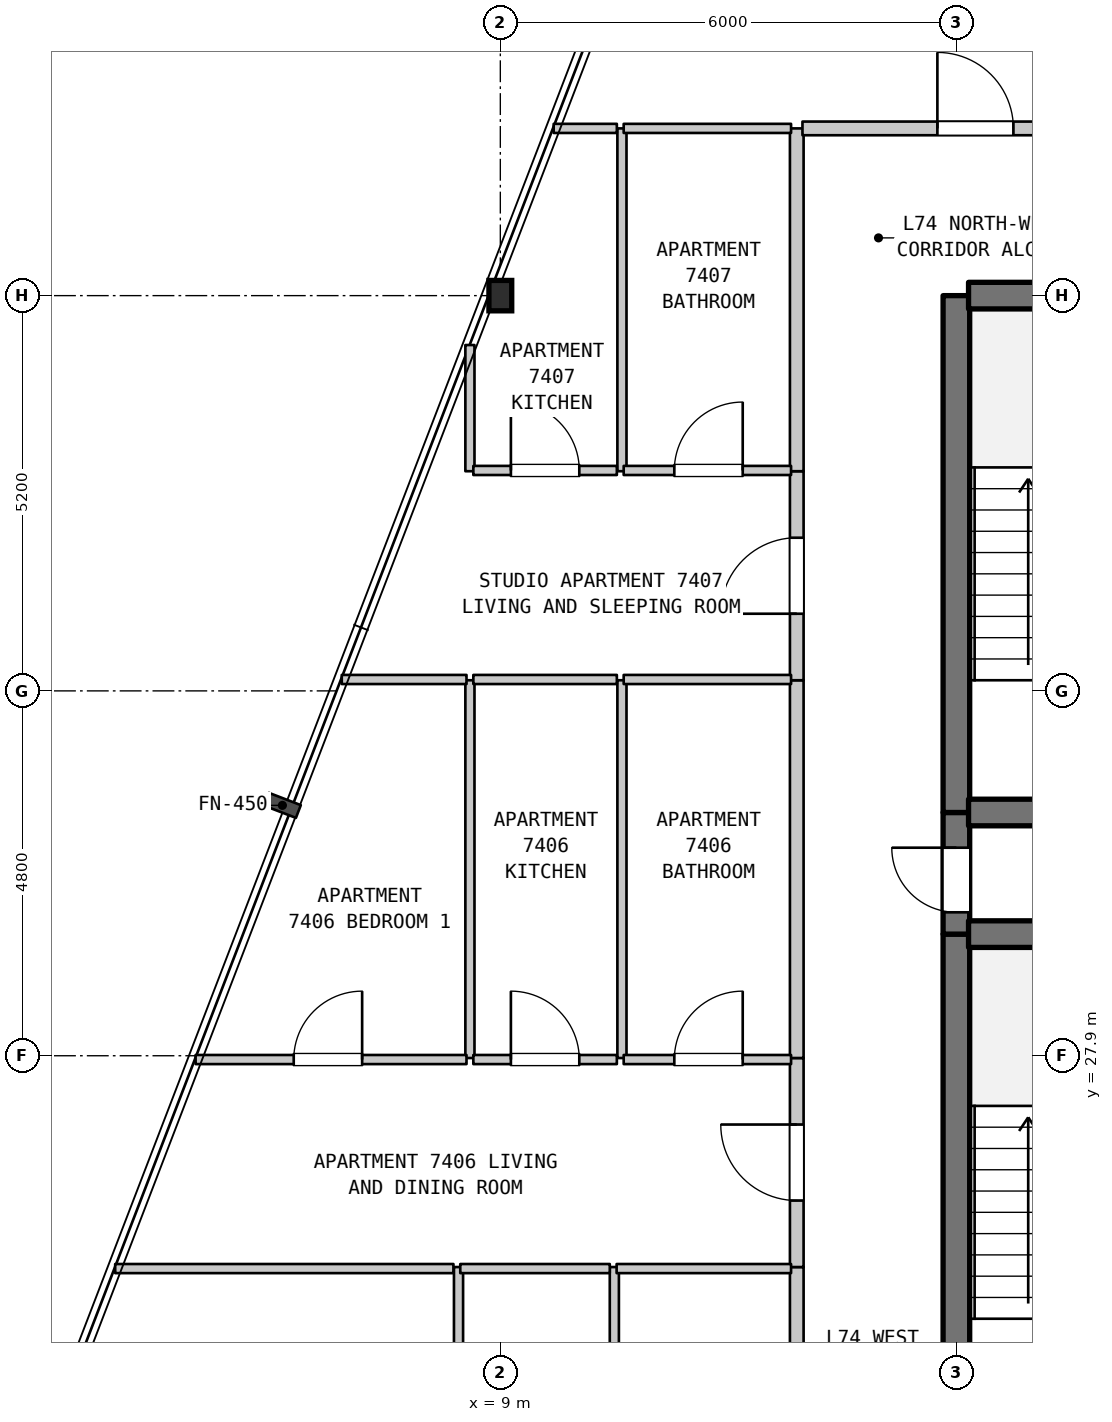
"""IFC4 building model, lengths in metres.
Left out: names, types, materials, properties, quantities, classifications, styles, units other than length and angle.
Written with IfcOpenShell. Run it as: python <this file> out.ifc"""

import sys

from ifc_helpers import new_model, si_unit, direction, frame, frame_2d, origin, origin_2d, place, context, subcontext, project, spatial, rectangle, i_section, extrude, element, fill, save


model = new_model("IFC4")
c1 = context("Model", 3, precision=1e-05, world=origin(), true_north=direction((0.0, 1.0)))
c2 = subcontext(c1, "Body", "Model", "MODEL_VIEW")
j1 = project(units=[si_unit("LENGTHUNIT", "METRE"), si_unit("PLANEANGLEUNIT", "RADIAN")], contexts=[c1])
p1 = place(None, origin())
s1 = spatial("IfcSite", under=j1, at=p1, CompositionType="ELEMENT")
p2 = place(p1, origin())
s2 = spatial("IfcBuilding", under=s1, at=p2, CompositionType="ELEMENT")
p3 = place(p2, frame((0.0, 0.0, 295.4)))
s3 = spatial("IfcBuildingStorey", under=s2, at=p3, CompositionType="ELEMENT", Elevation=295.4)
p4 = place(p3, frame((9.0, 37.9, 0.0), z_axis=(0.0, 0.0, 1.0), x_axis=(1.0, 0.0, 0.0)))
e1 = element("IfcColumn", 1, at=p4, inside=s3, PredefinedType="COLUMN", context=c2, shape_type="SweptSolid", body=[
    extrude(i_section(OverallWidth=0.3, OverallDepth=0.4, WebThickness=0.013, FlangeThickness=0.024, FilletRadius=0.027, at=origin_2d()), origin(), (0.0, 0.0, 1.0), 3.7),
])
p5 = place(p3, frame((8.45, 20.15, 0.0), z_axis=(0.0, 0.0, 1.0), x_axis=(0.0, 1.0, 0.0)))
e2 = element("IfcWall", 2, at=p5, inside=s3, PredefinedType="PARTITIONING", context=c2, shape_type="SweptSolid", body=[
    extrude(rectangle(XDim=4.97, YDim=0.12, at=frame_2d((2.485, 0.0))), origin(), (0.0, 0.0, 1.0), 3.38),
])
p6 = place(p3, frame((8.6, 27.87, 0.0), z_axis=(0.0, 0.0, 1.0), x_axis=(0.0, 1.0, 0.0)))
e3 = element("IfcWall", 3, at=p6, inside=s3, PredefinedType="PARTITIONING", context=c2, shape_type="SweptSolid", body=[
    extrude(rectangle(XDim=4.97, YDim=0.12, at=frame_2d((2.485, 0.0))), origin(), (0.0, 0.0, 1.0), 3.38),
])
p7 = place(p3, frame((8.6, 35.59, 0.0), z_axis=(0.0, 0.0, 1.0), x_axis=(0.0, 1.0, 0.0)))
e4 = element("IfcWall", 4, at=p7, inside=s3, PredefinedType="PARTITIONING", context=c2, shape_type="SweptSolid", body=[
    extrude(rectangle(XDim=1.66, YDim=0.12, at=frame_2d((0.83, 0.0))), origin(), (0.0, 0.0, 1.0), 3.38),
])
p8 = place(p3, frame((10.5, 20.15, 0.0), z_axis=(0.0, 0.0, 1.0), x_axis=(0.0, 1.0, 0.0)))
e5 = element("IfcWall", 5, at=p8, inside=s3, PredefinedType="PARTITIONING", context=c2, shape_type="SweptSolid", body=[
    extrude(rectangle(XDim=4.97, YDim=0.12, at=frame_2d((2.485, 0.0))), origin(), (0.0, 0.0, 1.0), 3.38),
])
p9 = place(p3, frame((10.6, 27.87, 0.0), z_axis=(0.0, 0.0, 1.0), x_axis=(0.0, 1.0, 0.0)))
e6 = element("IfcWall", 6, at=p9, inside=s3, PredefinedType="PARTITIONING", context=c2, shape_type="SweptSolid", body=[
    extrude(rectangle(XDim=4.97, YDim=0.12, at=frame_2d((2.485, 0.0))), origin(), (0.0, 0.0, 1.0), 3.38),
])
p10 = place(p3, frame((10.6, 35.59, 0.0), z_axis=(0.0, 0.0, 1.0), x_axis=(0.0, 1.0, 0.0)))
e7 = element("IfcWall", 7, at=p10, inside=s3, PredefinedType="PARTITIONING", context=c2, shape_type="SweptSolid", body=[
    extrude(rectangle(XDim=4.51, YDim=0.12, at=frame_2d((2.255, 0.0))), origin(), (0.0, 0.0, 1.0), 3.38),
])
p11 = place(p3, frame((12.9, 20.15, 0.0), z_axis=(0.0, 0.0, 1.0), x_axis=(0.0, 1.0, 0.0)))
e8 = element("IfcWall", 8, at=p11, inside=s3, PredefinedType="STANDARD", context=c2, shape_type="SweptSolid", body=[
    extrude(rectangle(XDim=4.97, YDim=0.18, at=frame_2d((2.485, 0.0))), origin(), (0.0, 0.0, 1.0), 3.38),
])
p12 = place(p3, frame((12.9, 25.12, 0.0), z_axis=(0.0, 0.0, 1.0), x_axis=(0.0, 1.0, 0.0)))
e9 = element("IfcWall", 9, at=p12, inside=s3, PredefinedType="STANDARD", context=c2, shape_type="SweptSolid", body=[
    extrude(rectangle(XDim=2.75, YDim=0.18, at=frame_2d((1.375, 0.0))), origin(), (0.0, 0.0, 1.0), 3.38),
])
p13 = place(p12, frame((0.875, 0.0, 0.0)))
e10 = element("IfcOpeningElement", 10, at=p13, cuts=e9, PredefinedType="OPENING", context=c2, shape_type="SweptSolid", body=[
    extrude(rectangle(XDim=1.0, YDim=2.15, at=frame_2d((0.5, 1.075))), frame((0.0, 0.1, 0.0), z_axis=(0.0, -1.0, 0.0), x_axis=(1.0, 0.0, 0.0)), (0.0, 0.0, 1.0), 0.2),
])
p14 = place(p3, frame((12.9, 27.87, 0.0), z_axis=(0.0, 0.0, 1.0), x_axis=(0.0, 1.0, 0.0)))
e11 = element("IfcWall", 11, at=p14, inside=s3, PredefinedType="STANDARD", context=c2, shape_type="SweptSolid", body=[
    extrude(rectangle(XDim=4.97, YDim=0.18, at=frame_2d((2.485, 0.0))), origin(), (0.0, 0.0, 1.0), 3.38),
])
p15 = place(p3, frame((12.9, 32.84, 0.0), z_axis=(0.0, 0.0, 1.0), x_axis=(0.0, 1.0, 0.0)))
e12 = element("IfcWall", 12, at=p15, inside=s3, PredefinedType="STANDARD", context=c2, shape_type="SweptSolid", body=[
    extrude(rectangle(XDim=2.75, YDim=0.18, at=frame_2d((1.375, 0.0))), origin(), (0.0, 0.0, 1.0), 3.38),
])
p16 = place(p15, frame((0.875, 0.0, 0.0)))
e13 = element("IfcOpeningElement", 13, at=p16, cuts=e12, PredefinedType="OPENING", context=c2, shape_type="SweptSolid", body=[
    extrude(rectangle(XDim=1.0, YDim=2.15, at=frame_2d((0.5, 1.075))), frame((0.0, 0.1, 0.0), z_axis=(0.0, -1.0, 0.0), x_axis=(1.0, 0.0, 0.0)), (0.0, 0.0, 1.0), 0.2),
])
p17 = place(p3, frame((12.9, 35.59, 0.0), z_axis=(0.0, 0.0, 1.0), x_axis=(0.0, 1.0, 0.0)))
e14 = element("IfcWall", 14, at=p17, inside=s3, PredefinedType="STANDARD", context=c2, shape_type="SweptSolid", body=[
    extrude(rectangle(XDim=4.51, YDim=0.18, at=frame_2d((2.255, 0.0))), origin(), (0.0, 0.0, 1.0), 3.38),
])
p18 = place(p3, frame((15.0, 22.7, 0.0), z_axis=(0.0, 0.0, 1.0), x_axis=(0.0, 1.0, 0.0)))
e15 = element("IfcWall", 15, at=p18, inside=s3, PredefinedType="SHEAR", context=c2, shape_type="SweptSolid", body=[
    extrude(rectangle(XDim=6.8, YDim=0.35, at=frame_2d((3.4, 0.0))), origin(), (0.0, 0.0, 1.0), 3.38),
])
p19 = place(p3, frame((15.0, 29.5, 0.0), z_axis=(0.0, 0.0, 1.0), x_axis=(0.0, 1.0, 0.0)))
e16 = element("IfcWall", 16, at=p19, inside=s3, PredefinedType="SHEAR", context=c2, shape_type="SweptSolid", body=[
    extrude(rectangle(XDim=1.6, YDim=0.35, at=frame_2d((0.8, 0.0))), origin(), (0.0, 0.0, 1.0), 3.38),
])
p20 = place(p19, frame((0.287, 0.0, 0.0)))
e17 = element("IfcOpeningElement", 17, at=p20, cuts=e16, PredefinedType="OPENING", context=c2, shape_type="SweptSolid", body=[
    extrude(rectangle(XDim=0.85, YDim=2.1, at=frame_2d((0.425, 1.05))), frame((0.0, 0.185, 0.0), z_axis=(0.0, -1.0, 0.0), x_axis=(1.0, 0.0, 0.0)), (0.0, 0.0, 1.0), 0.37),
])
p21 = place(p3, frame((15.0, 31.1, 0.0), z_axis=(0.0, 0.0, 1.0), x_axis=(0.0, 1.0, 0.0)))
e18 = element("IfcWall", 18, at=p21, inside=s3, PredefinedType="SHEAR", context=c2, shape_type="SweptSolid", body=[
    extrude(rectangle(XDim=6.8, YDim=0.35, at=frame_2d((3.4, 0.0))), origin(), (0.0, 0.0, 1.0), 3.38),
])
p22 = place(p3, frame((3.933, 25.1, 0.0), z_axis=(0.0, 0.0, 1.0), x_axis=(1.0, 0.0, 0.0)))
e19 = element("IfcWall", 19, at=p22, inside=s3, PredefinedType="PARTITIONING", context=c2, shape_type="SweptSolid", body=[
    extrude(rectangle(XDim=4.45, YDim=0.12, at=frame_2d((2.225, 0.0))), origin(), (0.0, 0.0, 1.0), 3.38),
])
p23 = place(p3, frame((8.473, 25.1, 0.0), z_axis=(0.0, 0.0, 1.0), x_axis=(1.0, 0.0, 0.0)))
e20 = element("IfcWall", 20, at=p23, inside=s3, PredefinedType="PARTITIONING", context=c2, shape_type="SweptSolid", body=[
    extrude(rectangle(XDim=1.967, YDim=0.12, at=frame_2d((0.983, 0.0))), origin(), (0.0, 0.0, 1.0), 3.38),
])
p24 = place(p3, frame((10.53, 25.1, 0.0), z_axis=(0.0, 0.0, 1.0), x_axis=(1.0, 0.0, 0.0)))
e21 = element("IfcWall", 21, at=p24, inside=s3, PredefinedType="PARTITIONING", context=c2, shape_type="SweptSolid", body=[
    extrude(rectangle(XDim=2.295, YDim=0.12, at=frame_2d((1.147, 0.0))), origin(), (0.0, 0.0, 1.0), 3.38),
])
p25 = place(p3, frame((4.991, 27.85, 0.0), z_axis=(0.0, 0.0, 1.0), x_axis=(1.0, 0.0, 0.0)))
e22 = element("IfcWall", 22, at=p25, inside=s3, PredefinedType="PARTITIONING", context=c2, shape_type="SweptSolid", body=[
    extrude(rectangle(XDim=3.564, YDim=0.12, at=frame_2d((1.782, 0.0))), origin(), (0.0, 0.0, 1.0), 3.38),
])
p26 = place(p25, frame((1.291, 0.0, 0.0)))
e23 = element("IfcOpeningElement", 23, at=p26, cuts=e22, PredefinedType="OPENING", context=c2, shape_type="SweptSolid", body=[
    extrude(rectangle(XDim=0.9, YDim=2.15, at=frame_2d((0.45, 1.075))), frame((0.0, 0.07, 0.0), z_axis=(0.0, -1.0, 0.0), x_axis=(1.0, 0.0, 0.0)), (0.0, 0.0, 1.0), 0.14),
])
p27 = place(p3, frame((8.645, 27.85, 0.0), z_axis=(0.0, 0.0, 1.0), x_axis=(1.0, 0.0, 0.0)))
e24 = element("IfcWall", 24, at=p27, inside=s3, PredefinedType="PARTITIONING", context=c2, shape_type="SweptSolid", body=[
    extrude(rectangle(XDim=1.888, YDim=0.12, at=frame_2d((0.944, 0.0))), origin(), (0.0, 0.0, 1.0), 3.38),
])
p28 = place(p27, frame((0.494, 0.0, 0.0)))
e25 = element("IfcOpeningElement", 25, at=p28, cuts=e24, PredefinedType="OPENING", context=c2, shape_type="SweptSolid", body=[
    extrude(rectangle(XDim=0.9, YDim=2.15, at=frame_2d((0.45, 1.075))), frame((0.0, 0.07, 0.0), z_axis=(0.0, -1.0, 0.0), x_axis=(1.0, 0.0, 0.0)), (0.0, 0.0, 1.0), 0.14),
])
p29 = place(p3, frame((10.623, 27.85, 0.0), z_axis=(0.0, 0.0, 1.0), x_axis=(1.0, 0.0, 0.0)))
e26 = element("IfcWall", 26, at=p29, inside=s3, PredefinedType="PARTITIONING", context=c2, shape_type="SweptSolid", body=[
    extrude(rectangle(XDim=2.202, YDim=0.12, at=frame_2d((1.101, 0.0))), origin(), (0.0, 0.0, 1.0), 3.38),
])
p30 = place(p29, frame((0.666, 0.0, 0.0)))
e27 = element("IfcOpeningElement", 27, at=p30, cuts=e26, PredefinedType="OPENING", context=c2, shape_type="SweptSolid", body=[
    extrude(rectangle(XDim=0.9, YDim=2.1, at=frame_2d((0.45, 1.05))), frame((0.0, 0.07, 0.0), z_axis=(0.0, -1.0, 0.0), x_axis=(1.0, 0.0, 0.0)), (0.0, 0.0, 1.0), 0.14),
])
for number, where, z_axis, x_axis in (
    (28, (15.16, 29.5, 0.0), (0.0, 0.0, 1.0), (1.0, 0.0, 0.0)),
    (29, (15.16, 31.1, 0.0), (0.0, 0.0, 1.0), (1.0, 0.0, 0.0)),
):
    element("IfcWall", number, at=place(p3, frame(where, z_axis=z_axis, x_axis=x_axis)), inside=s3, PredefinedType="SHEAR", context=c2, shape_type="SweptSolid", body=[
        extrude(rectangle(XDim=3.68, YDim=0.35, at=frame_2d((1.84, 0.0))), origin(), (0.0, 0.0, 1.0), 3.38),
    ])
p31 = place(p3, frame((6.914, 32.85, 0.0), z_axis=(0.0, 0.0, 1.0), x_axis=(1.0, 0.0, 0.0)))
e30 = element("IfcWall", 30, at=p31, inside=s3, PredefinedType="PARTITIONING", context=c2, shape_type="SweptSolid", body=[
    extrude(rectangle(XDim=1.641, YDim=0.12, at=frame_2d((0.82, 0.0))), origin(), (0.0, 0.0, 1.0), 3.38),
])
p32 = place(p3, frame((8.645, 32.85, 0.0), z_axis=(0.0, 0.0, 1.0), x_axis=(1.0, 0.0, 0.0)))
e31 = element("IfcWall", 31, at=p32, inside=s3, PredefinedType="PARTITIONING", context=c2, shape_type="SweptSolid", body=[
    extrude(rectangle(XDim=1.888, YDim=0.12, at=frame_2d((0.944, 0.0))), origin(), (0.0, 0.0, 1.0), 3.38),
])
p33 = place(p3, frame((10.623, 32.85, 0.0), z_axis=(0.0, 0.0, 1.0), x_axis=(1.0, 0.0, 0.0)))
e32 = element("IfcWall", 32, at=p33, inside=s3, PredefinedType="PARTITIONING", context=c2, shape_type="SweptSolid", body=[
    extrude(rectangle(XDim=2.202, YDim=0.12, at=frame_2d((1.101, 0.0))), origin(), (0.0, 0.0, 1.0), 3.38),
])
p34 = place(p3, frame((8.645, 35.6, 0.0), z_axis=(0.0, 0.0, 1.0), x_axis=(1.0, 0.0, 0.0)))
e33 = element("IfcWall", 33, at=p34, inside=s3, PredefinedType="PARTITIONING", context=c2, shape_type="SweptSolid", body=[
    extrude(rectangle(XDim=1.888, YDim=0.12, at=frame_2d((0.944, 0.0))), origin(), (0.0, 0.0, 1.0), 3.38),
])
p35 = place(p34, frame((0.494, 0.0, 0.0)))
e34 = element("IfcOpeningElement", 34, at=p35, cuts=e33, PredefinedType="OPENING", context=c2, shape_type="SweptSolid", body=[
    extrude(rectangle(XDim=0.9, YDim=2.15, at=frame_2d((0.45, 1.075))), frame((0.0, 0.07, 0.0), z_axis=(0.0, -1.0, 0.0), x_axis=(1.0, 0.0, 0.0)), (0.0, 0.0, 1.0), 0.14),
])
p36 = place(p3, frame((10.623, 35.6, 0.0), z_axis=(0.0, 0.0, 1.0), x_axis=(1.0, 0.0, 0.0)))
e35 = element("IfcWall", 35, at=p36, inside=s3, PredefinedType="PARTITIONING", context=c2, shape_type="SweptSolid", body=[
    extrude(rectangle(XDim=2.202, YDim=0.12, at=frame_2d((1.101, 0.0))), origin(), (0.0, 0.0, 1.0), 3.38),
])
p37 = place(p36, frame((0.666, 0.0, 0.0)))
e36 = element("IfcOpeningElement", 36, at=p37, cuts=e35, PredefinedType="OPENING", context=c2, shape_type="SweptSolid", body=[
    extrude(rectangle(XDim=0.9, YDim=2.1, at=frame_2d((0.45, 1.05))), frame((0.0, 0.07, 0.0), z_axis=(0.0, -1.0, 0.0), x_axis=(1.0, 0.0, 0.0)), (0.0, 0.0, 1.0), 0.14),
])
p38 = place(p3, frame((15.16, 37.9, 0.0), z_axis=(0.0, 0.0, 1.0), x_axis=(1.0, 0.0, 0.0)))
e37 = element("IfcWall", 37, at=p38, inside=s3, PredefinedType="SHEAR", context=c2, shape_type="SweptSolid", body=[
    extrude(rectangle(XDim=3.68, YDim=0.35, at=frame_2d((1.84, 0.0))), origin(), (0.0, 0.0, 1.0), 3.38),
])
p39 = place(p3, frame((9.702, 40.1, 0.0), z_axis=(0.0, 0.0, 1.0), x_axis=(1.0, 0.0, 0.0)))
e38 = element("IfcWall", 38, at=p39, inside=s3, PredefinedType="PARTITIONING", context=c2, shape_type="SweptSolid", body=[
    extrude(rectangle(XDim=0.831, YDim=0.12, at=frame_2d((0.416, 0.0))), origin(), (0.0, 0.0, 1.0), 3.38),
])
p40 = place(p3, frame((10.623, 40.1, 0.0), z_axis=(0.0, 0.0, 1.0), x_axis=(1.0, 0.0, 0.0)))
e39 = element("IfcWall", 39, at=p40, inside=s3, PredefinedType="PARTITIONING", context=c2, shape_type="SweptSolid", body=[
    extrude(rectangle(XDim=2.202, YDim=0.12, at=frame_2d((1.101, 0.0))), origin(), (0.0, 0.0, 1.0), 3.38),
])
p41 = place(p3, frame((12.975, 40.1, 0.0), z_axis=(0.0, 0.0, 1.0), x_axis=(1.0, 0.0, 0.0)))
e40 = element("IfcWall", 40, at=p41, inside=s3, PredefinedType="STANDARD", context=c2, shape_type="SweptSolid", body=[
    extrude(rectangle(XDim=4.58, YDim=0.18, at=frame_2d((2.29, 0.0))), origin(), (0.0, 0.0, 1.0), 3.38),
])
p42 = place(p41, frame((1.775, 0.0, 0.0)))
e41 = element("IfcOpeningElement", 41, at=p42, cuts=e40, PredefinedType="OPENING", context=c2, shape_type="SweptSolid", body=[
    extrude(rectangle(XDim=1.0, YDim=2.15, at=frame_2d((0.5, 1.075))), frame((0.0, 0.1, 0.0), z_axis=(0.0, -1.0, 0.0), x_axis=(1.0, 0.0, 0.0)), (0.0, 0.0, 1.0), 0.2),
])
p43 = place(p13, origin())
e42 = element("IfcDoor", 42, at=p43, inside=s3, OperationType="SINGLE_SWING_RIGHT", PredefinedType="DOOR", context=c2, shape_type="SweptSolid", body=[
    extrude(rectangle(XDim=1.0, YDim=2.15, at=frame_2d((0.5, 1.075))), frame((0.0, 0.025, 0.0), z_axis=(0.0, -1.0, 0.0), x_axis=(1.0, 0.0, 0.0)), (0.0, 0.0, 1.0), 0.05),
])
fill(e10, e42)
p44 = place(p16, origin())
e43 = element("IfcDoor", 43, at=p44, inside=s3, OperationType="SINGLE_SWING_LEFT", PredefinedType="DOOR", context=c2, shape_type="SweptSolid", body=[
    extrude(rectangle(XDim=1.0, YDim=2.15, at=frame_2d((0.5, 1.075))), frame((0.0, 0.025, 0.0), z_axis=(0.0, -1.0, 0.0), x_axis=(1.0, 0.0, 0.0)), (0.0, 0.0, 1.0), 0.05),
])
fill(e13, e43)
p45 = place(p20, origin())
e44 = element("IfcDoor", 44, at=p45, inside=s3, OperationType="SINGLE_SWING_RIGHT", PredefinedType="DOOR", context=c2, shape_type="SweptSolid", body=[
    extrude(rectangle(XDim=0.85, YDim=2.1, at=frame_2d((0.425, 1.05))), frame((0.0, 0.025, 0.0), z_axis=(0.0, -1.0, 0.0), x_axis=(1.0, 0.0, 0.0)), (0.0, 0.0, 1.0), 0.05),
])
fill(e17, e44)
p46 = place(p26, origin())
e45 = element("IfcDoor", 45, at=p46, inside=s3, OperationType="SINGLE_SWING_RIGHT", PredefinedType="DOOR", context=c2, shape_type="SweptSolid", body=[
    extrude(rectangle(XDim=0.9, YDim=2.15, at=frame_2d((0.45, 1.075))), frame((0.0, 0.025, 0.0), z_axis=(0.0, -1.0, 0.0), x_axis=(1.0, 0.0, 0.0)), (0.0, 0.0, 1.0), 0.05),
])
fill(e23, e45)
p47 = place(p28, origin())
e46 = element("IfcDoor", 46, at=p47, inside=s3, OperationType="SINGLE_SWING_LEFT", PredefinedType="DOOR", context=c2, shape_type="SweptSolid", body=[
    extrude(rectangle(XDim=0.9, YDim=2.15, at=frame_2d((0.45, 1.075))), frame((0.0, 0.025, 0.0), z_axis=(0.0, -1.0, 0.0), x_axis=(1.0, 0.0, 0.0)), (0.0, 0.0, 1.0), 0.05),
])
fill(e25, e46)
p48 = place(p30, origin())
e47 = element("IfcDoor", 47, at=p48, inside=s3, OperationType="SINGLE_SWING_RIGHT", PredefinedType="DOOR", context=c2, shape_type="SweptSolid", body=[
    extrude(rectangle(XDim=0.9, YDim=2.1, at=frame_2d((0.45, 1.05))), frame((0.0, 0.025, 0.0), z_axis=(0.0, -1.0, 0.0), x_axis=(1.0, 0.0, 0.0)), (0.0, 0.0, 1.0), 0.05),
])
fill(e27, e47)
p49 = place(p35, origin())
e48 = element("IfcDoor", 48, at=p49, inside=s3, OperationType="SINGLE_SWING_LEFT", PredefinedType="DOOR", context=c2, shape_type="SweptSolid", body=[
    extrude(rectangle(XDim=0.9, YDim=2.15, at=frame_2d((0.45, 1.075))), frame((0.0, 0.025, 0.0), z_axis=(0.0, -1.0, 0.0), x_axis=(1.0, 0.0, 0.0)), (0.0, 0.0, 1.0), 0.05),
])
fill(e34, e48)
p50 = place(p37, origin())
e49 = element("IfcDoor", 49, at=p50, inside=s3, OperationType="SINGLE_SWING_RIGHT", PredefinedType="DOOR", context=c2, shape_type="SweptSolid", body=[
    extrude(rectangle(XDim=0.9, YDim=2.1, at=frame_2d((0.45, 1.05))), frame((0.0, 0.025, 0.0), z_axis=(0.0, -1.0, 0.0), x_axis=(1.0, 0.0, 0.0)), (0.0, 0.0, 1.0), 0.05),
])
fill(e36, e49)
p51 = place(p42, origin())
e50 = element("IfcDoor", 50, at=p51, inside=s3, OperationType="SINGLE_SWING_LEFT", PredefinedType="DOOR", context=c2, shape_type="SweptSolid", body=[
    extrude(rectangle(XDim=1.0, YDim=2.15, at=frame_2d((0.5, 1.075))), frame((0.0, 0.025, 0.0), z_axis=(0.0, -1.0, 0.0), x_axis=(1.0, 0.0, 0.0)), (0.0, 0.0, 1.0), 0.05),
])
fill(e41, e50)
save(model, sys.argv[1])
